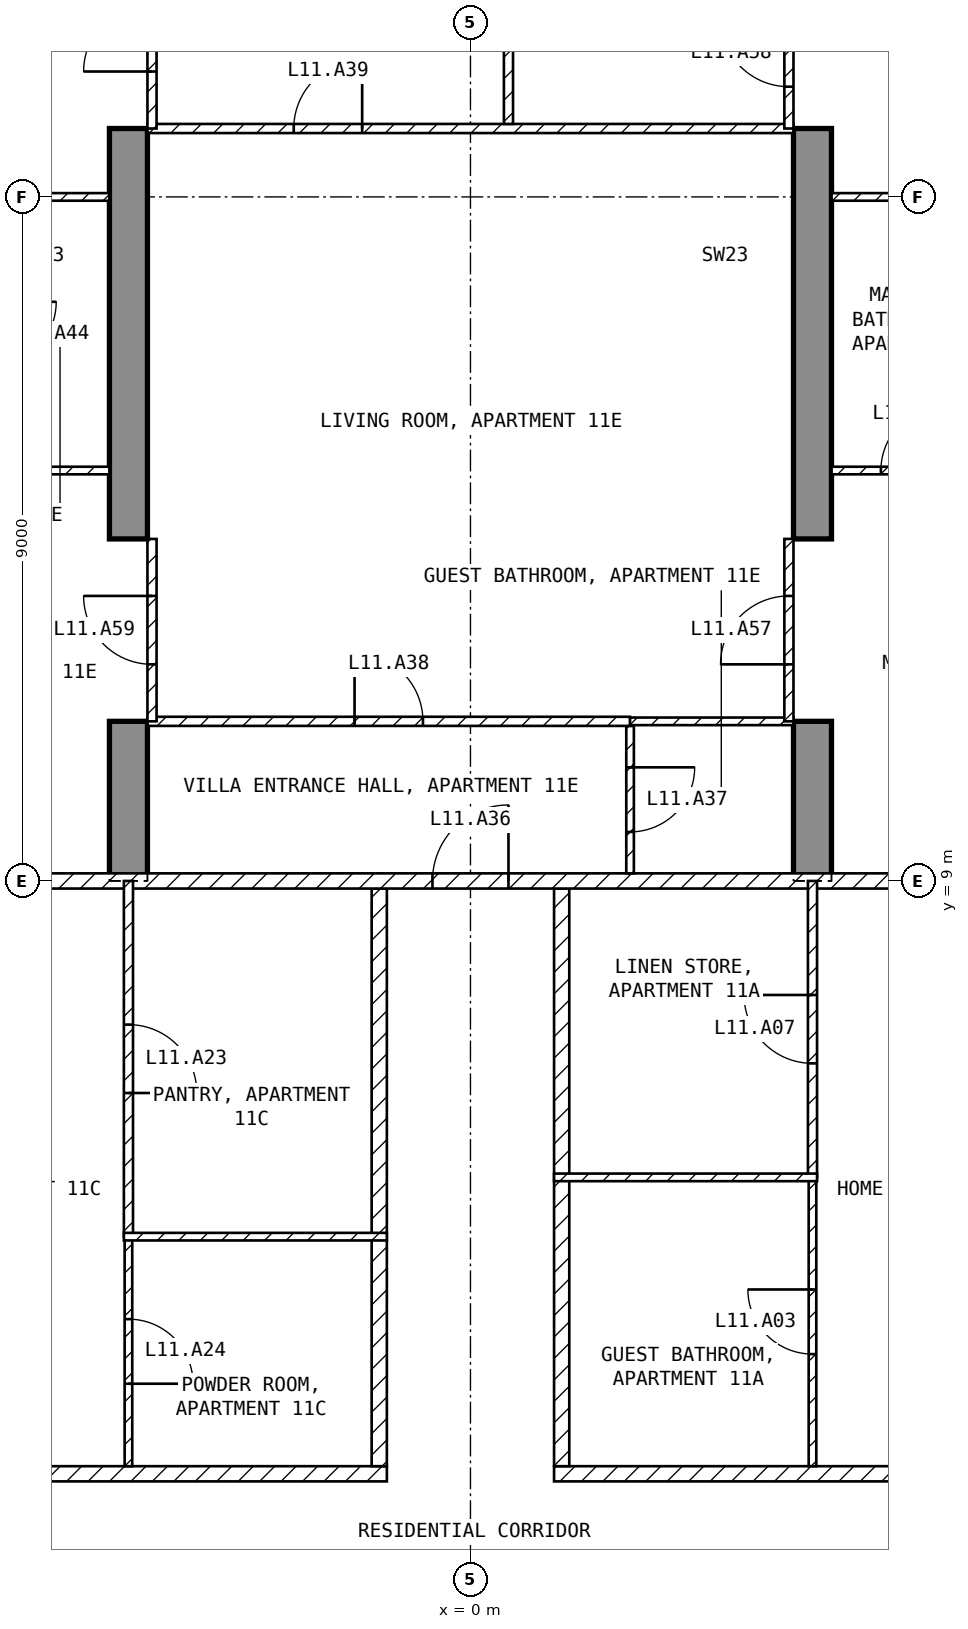
"""IFC4 building model, lengths in metres.
Left out: names, types, materials, properties, quantities, classifications, styles, units other than length and angle.
Written with IfcOpenShell. Run it as: python <this file> out.ifc"""

import sys

from ifc_helpers import new_model, si_unit, direction, frame, frame_2d, origin, place, context, subcontext, project, spatial, polyline, rectangle, outline, extrude, element, fill, save


model = new_model("IFC4")
c1 = context("Model", 3, precision=1e-05, world=origin(), true_north=direction((0.0, 1.0)))
c2 = subcontext(c1, "Body", "Model", "MODEL_VIEW")
j1 = project(units=[si_unit("LENGTHUNIT", "METRE"), si_unit("PLANEANGLEUNIT", "RADIAN")], contexts=[c1])
p1 = place(None, origin())
s1 = spatial("IfcSite", under=j1, at=p1, CompositionType="ELEMENT")
p2 = place(p1, origin())
s2 = spatial("IfcBuilding", under=s1, at=p2, CompositionType="ELEMENT")
p3 = place(p2, frame((0.0, 0.0, 57.5)))
s3 = spatial("IfcBuildingStorey", under=s2, at=p3, CompositionType="ELEMENT", Elevation=57.5)
for number, where, z_axis, x_axis in (
    (1, (-4.75, 9.0, -0.25), (1.0, 0.0, 0.0), (0.0, 1.0, 0.0)),
    (2, (4.25, 9.0, -0.25), (1.0, 0.0, 0.0), (0.0, 1.0, 0.0)),
):
    element("IfcWall", number, at=place(p3, frame(where, z_axis=z_axis, x_axis=x_axis)), inside=s3, PredefinedType="SHEAR", context=c2, shape_type="SweptSolid", body=[
        extrude(outline(polyline([(0.0, 0.0), (2.1, 0.0), (2.1, 2.65), (4.5, 2.65), (4.5, 0.0), (9.9, 0.0), (9.9, 2.65), (12.3, 2.65), (12.3, 0.0), (16.45, 0.0), (16.45, 3.5), (0.0, 3.5), (0.0, 0.0)])), origin(), (0.0, 0.0, 1.0), 0.5),
    ])
p4 = place(p3, frame((1.1, 1.2, 0.0), z_axis=(0.0, 0.0, 1.0), x_axis=(1.0, 0.0, 0.0)))
e3 = element("IfcWall", 3, at=p4, inside=s3, PredefinedType="PARTITIONING", context=c2, shape_type="SweptSolid", body=[
    extrude(rectangle(XDim=20.5, YDim=0.2, at=frame_2d((10.25, 0.0))), origin(), (0.0, 0.0, 1.0), 3.25),
])
p5 = place(p4, frame((9.2, 0.0, 0.0)))
e4 = element("IfcOpeningElement", 4, at=p5, cuts=e3, PredefinedType="OPENING", context=c2, shape_type="SweptSolid", body=[
    extrude(rectangle(XDim=1.0, YDim=2.1, at=frame_2d((0.5, 1.05))), frame((0.0, 0.11, 0.0), z_axis=(0.0, -1.0, 0.0), x_axis=(1.0, 0.0, 0.0)), (0.0, 0.0, 1.0), 0.22),
])
p6 = place(p3, frame((1.2, 8.9, 0.0), z_axis=(0.0, 0.0, 1.0), x_axis=(0.0, -1.0, 0.0)))
e5 = element("IfcWall", 5, at=p6, inside=s3, PredefinedType="PARTITIONING", context=c2, shape_type="SweptSolid", body=[
    extrude(rectangle(XDim=7.6, YDim=0.2, at=frame_2d((3.8, 0.0))), origin(), (0.0, 0.0, 1.0), 3.25),
])
p7 = place(p3, frame((-21.6, 1.2, 0.0), z_axis=(0.0, 0.0, 1.0), x_axis=(1.0, 0.0, 0.0)))
e6 = element("IfcWall", 6, at=p7, inside=s3, PredefinedType="PARTITIONING", context=c2, shape_type="SweptSolid", body=[
    extrude(rectangle(XDim=20.5, YDim=0.2, at=frame_2d((10.25, 0.0))), origin(), (0.0, 0.0, 1.0), 3.25),
])
p8 = place(p7, frame((10.3, 0.0, 0.0)))
e7 = element("IfcOpeningElement", 7, at=p8, cuts=e6, PredefinedType="OPENING", context=c2, shape_type="SweptSolid", body=[
    extrude(rectangle(XDim=1.0, YDim=2.1, at=frame_2d((0.5, 1.05))), frame((0.0, 0.11, 0.0), z_axis=(0.0, -1.0, 0.0), x_axis=(1.0, 0.0, 0.0)), (0.0, 0.0, 1.0), 0.22),
])
p9 = place(p3, frame((-1.2, 1.3, 0.0), z_axis=(0.0, 0.0, 1.0), x_axis=(0.0, 1.0, 0.0)))
e8 = element("IfcWall", 8, at=p9, inside=s3, PredefinedType="PARTITIONING", context=c2, shape_type="SweptSolid", body=[
    extrude(rectangle(XDim=7.6, YDim=0.2, at=frame_2d((3.8, 0.0))), origin(), (0.0, 0.0, 1.0), 3.25),
])
p10 = place(p3, frame((-8.92, 9.0, 0.0), z_axis=(0.0, 0.0, 1.0), x_axis=(1.0, 0.0, 0.0)))
e9 = element("IfcWall", 9, at=p10, inside=s3, PredefinedType="PARTITIONING", context=c2, shape_type="SweptSolid", body=[
    extrude(rectangle(XDim=17.84, YDim=0.2, at=frame_2d((8.92, 0.0))), origin(), (0.0, 0.0, 1.0), 3.25),
])
p11 = place(p10, frame((8.42, 0.0, 0.0)))
e10 = element("IfcOpeningElement", 10, at=p11, cuts=e9, PredefinedType="OPENING", context=c2, shape_type="SweptSolid", body=[
    extrude(rectangle(XDim=1.0, YDim=2.1, at=frame_2d((0.5, 1.05))), frame((0.0, 0.11, 0.0), z_axis=(0.0, -1.0, 0.0), x_axis=(1.0, 0.0, 0.0)), (0.0, 0.0, 1.0), 0.22),
])
p12 = place(p3, frame((4.5, 1.3, 0.0), z_axis=(0.0, 0.0, 1.0), x_axis=(0.0, 1.0, 0.0)))
e11 = element("IfcWall", 11, at=p12, inside=s3, PredefinedType="PARTITIONING", context=c2, shape_type="SweptSolid", body=[
    extrude(rectangle(XDim=3.8, YDim=0.1, at=frame_2d((1.9, 0.0))), origin(), (0.0, 0.0, 1.0), 3.25),
])
p13 = place(p12, frame((1.475, 0.0, 0.0)))
e12 = element("IfcOpeningElement", 12, at=p13, cuts=e11, PredefinedType="OPENING", context=c2, shape_type="SweptSolid", body=[
    extrude(rectangle(XDim=0.85, YDim=2.1, at=frame_2d((0.425, 1.05))), frame((0.0, 0.06, 0.0), z_axis=(0.0, -1.0, 0.0), x_axis=(1.0, 0.0, 0.0)), (0.0, 0.0, 1.0), 0.12),
])
p14 = place(p3, frame((4.5, 5.1, 0.0), z_axis=(0.0, 0.0, 1.0), x_axis=(0.0, 1.0, 0.0)))
e13 = element("IfcWall", 13, at=p14, inside=s3, PredefinedType="PARTITIONING", context=c2, shape_type="SweptSolid", body=[
    extrude(rectangle(XDim=3.9, YDim=0.12, at=frame_2d((1.95, 0.0))), origin(), (0.0, 0.0, 1.0), 3.25),
])
p15 = place(p14, frame((1.5, 0.0, 0.0)))
e14 = element("IfcOpeningElement", 14, at=p15, cuts=e13, PredefinedType="OPENING", context=c2, shape_type="SweptSolid", body=[
    extrude(rectangle(XDim=0.9, YDim=2.1, at=frame_2d((0.45, 1.05))), frame((0.0, 0.07, 0.0), z_axis=(0.0, -1.0, 0.0), x_axis=(1.0, 0.0, 0.0)), (0.0, 0.0, 1.0), 0.14),
])
p16 = place(p3, frame((1.1, 5.1, 0.0), z_axis=(0.0, 0.0, 1.0), x_axis=(1.0, 0.0, 0.0)))
e15 = element("IfcWall", 15, at=p16, inside=s3, PredefinedType="PARTITIONING", context=c2, shape_type="SweptSolid", body=[
    extrude(rectangle(XDim=3.46, YDim=0.1, at=frame_2d((1.73, 0.0))), origin(), (0.0, 0.0, 1.0), 3.25),
])
p17 = place(p3, frame((-4.5, 4.32, 0.0), z_axis=(0.0, 0.0, 1.0), x_axis=(0.0, -1.0, 0.0)))
e16 = element("IfcWall", 16, at=p17, inside=s3, PredefinedType="PARTITIONING", context=c2, shape_type="SweptSolid", body=[
    extrude(rectangle(XDim=3.02, YDim=0.1, at=frame_2d((1.51, 0.0))), origin(), (0.0, 0.0, 1.0), 3.25),
])
p18 = place(p17, frame((1.085, 0.0, 0.0)))
e17 = element("IfcOpeningElement", 17, at=p18, cuts=e16, PredefinedType="OPENING", context=c2, shape_type="SweptSolid", body=[
    extrude(rectangle(XDim=0.85, YDim=2.1, at=frame_2d((0.425, 1.05))), frame((0.0, 0.06, 0.0), z_axis=(0.0, -1.0, 0.0), x_axis=(1.0, 0.0, 0.0)), (0.0, 0.0, 1.0), 0.12),
])
p19 = place(p3, frame((-4.5, 9.0, 0.0), z_axis=(0.0, 0.0, 1.0), x_axis=(0.0, -1.0, 0.0)))
e18 = element("IfcWall", 18, at=p19, inside=s3, PredefinedType="PARTITIONING", context=c2, shape_type="SweptSolid", body=[
    extrude(rectangle(XDim=4.68, YDim=0.12, at=frame_2d((2.34, 0.0))), origin(), (0.0, 0.0, 1.0), 3.25),
])
p20 = place(p19, frame((1.89, 0.0, 0.0)))
e19 = element("IfcOpeningElement", 19, at=p20, cuts=e18, PredefinedType="OPENING", context=c2, shape_type="SweptSolid", body=[
    extrude(rectangle(XDim=0.9, YDim=2.1, at=frame_2d((0.45, 1.05))), frame((0.0, 0.07, 0.0), z_axis=(0.0, -1.0, 0.0), x_axis=(1.0, 0.0, 0.0)), (0.0, 0.0, 1.0), 0.14),
])
p21 = place(p3, frame((-4.56, 4.32, 0.0), z_axis=(0.0, 0.0, 1.0), x_axis=(1.0, 0.0, 0.0)))
e20 = element("IfcWall", 20, at=p21, inside=s3, PredefinedType="PARTITIONING", context=c2, shape_type="SweptSolid", body=[
    extrude(rectangle(XDim=3.46, YDim=0.1, at=frame_2d((1.73, 0.0))), origin(), (0.0, 0.0, 1.0), 3.25),
])
p22 = place(p3, frame((2.1, 11.04, 0.0), z_axis=(0.0, 0.0, 1.0), x_axis=(0.0, -1.0, 0.0)))
e21 = element("IfcWall", 21, at=p22, inside=s3, PredefinedType="PARTITIONING", context=c2, shape_type="SweptSolid", body=[
    extrude(rectangle(XDim=1.94, YDim=0.1, at=frame_2d((0.97, 0.0))), origin(), (0.0, 0.0, 1.0), 3.25),
])
p23 = place(p22, frame((0.545, 0.0, 0.0)))
e22 = element("IfcOpeningElement", 22, at=p23, cuts=e21, PredefinedType="OPENING", context=c2, shape_type="SweptSolid", body=[
    extrude(rectangle(XDim=0.85, YDim=2.1, at=frame_2d((0.425, 1.05))), frame((0.0, 0.06, 0.0), z_axis=(0.0, -1.0, 0.0), x_axis=(1.0, 0.0, 0.0)), (0.0, 0.0, 1.0), 0.12),
])
p24 = place(p3, frame((-4.25, 11.1, 0.0), z_axis=(0.0, 0.0, 1.0), x_axis=(1.0, 0.0, 0.0)))
e23 = element("IfcWall", 23, at=p24, inside=s3, PredefinedType="PARTITIONING", context=c2, shape_type="SweptSolid", body=[
    extrude(rectangle(XDim=6.35, YDim=0.12, at=frame_2d((3.175, 0.0))), origin(), (0.0, 0.0, 1.0), 3.25),
])
p25 = place(p24, frame((2.725, 0.0, 0.0)))
e24 = element("IfcOpeningElement", 24, at=p25, cuts=e23, PredefinedType="OPENING", context=c2, shape_type="SweptSolid", body=[
    extrude(rectangle(XDim=0.9, YDim=2.1, at=frame_2d((0.45, 1.05))), frame((0.0, 0.07, 0.0), z_axis=(0.0, -1.0, 0.0), x_axis=(1.0, 0.0, 0.0)), (0.0, 0.0, 1.0), 0.14),
])
p26 = place(p3, frame((2.1, 11.1, 0.0), z_axis=(0.0, 0.0, 1.0), x_axis=(1.0, 0.0, 0.0)))
e25 = element("IfcWall", 25, at=p26, inside=s3, PredefinedType="PARTITIONING", context=c2, shape_type="SweptSolid", body=[
    extrude(rectangle(XDim=2.15, YDim=0.1, at=frame_2d((1.075, 0.0))), origin(), (0.0, 0.0, 1.0), 3.25),
])
p27 = place(p3, frame((-4.25, 18.9, 0.0), z_axis=(0.0, 0.0, 1.0), x_axis=(1.0, 0.0, 0.0)))
e26 = element("IfcWall", 26, at=p27, inside=s3, PredefinedType="PARTITIONING", context=c2, shape_type="SweptSolid", body=[
    extrude(rectangle(XDim=8.5, YDim=0.12, at=frame_2d((4.25, 0.0))), origin(), (0.0, 0.0, 1.0), 3.25),
])
p28 = place(p27, frame((1.925, 0.0, 0.0)))
e27 = element("IfcOpeningElement", 27, at=p28, cuts=e26, PredefinedType="OPENING", context=c2, shape_type="SweptSolid", body=[
    extrude(rectangle(XDim=0.9, YDim=2.1, at=frame_2d((0.45, 1.05))), frame((0.0, 0.07, 0.0), z_axis=(0.0, -1.0, 0.0), x_axis=(1.0, 0.0, 0.0)), (0.0, 0.0, 1.0), 0.14),
])
p29 = place(p3, frame((0.5, 23.34, 0.0), z_axis=(0.0, 0.0, 1.0), x_axis=(0.0, -1.0, 0.0)))
e28 = element("IfcWall", 28, at=p29, inside=s3, PredefinedType="PARTITIONING", context=c2, shape_type="SweptSolid", body=[
    extrude(rectangle(XDim=4.38, YDim=0.12, at=frame_2d((2.19, 0.0))), origin(), (0.0, 0.0, 1.0), 3.25),
])
p30 = place(p29, frame((1.74, 0.0, 0.0)))
e29 = element("IfcOpeningElement", 29, at=p30, cuts=e28, PredefinedType="OPENING", context=c2, shape_type="SweptSolid", body=[
    extrude(rectangle(XDim=0.9, YDim=2.1, at=frame_2d((0.45, 1.05))), frame((0.0, 0.07, 0.0), z_axis=(0.0, -1.0, 0.0), x_axis=(1.0, 0.0, 0.0)), (0.0, 0.0, 1.0), 0.14),
])
p31 = place(p3, frame((4.75, 14.4, 0.0), z_axis=(0.0, 0.0, 1.0), x_axis=(1.0, 0.0, 0.0)))
e30 = element("IfcWall", 30, at=p31, inside=s3, PredefinedType="PARTITIONING", context=c2, shape_type="SweptSolid", body=[
    extrude(rectangle(XDim=2.2, YDim=0.1, at=frame_2d((1.1, 0.0))), origin(), (0.0, 0.0, 1.0), 3.25),
])
p32 = place(p31, frame((0.65, 0.0, 0.0)))
e31 = element("IfcOpeningElement", 31, at=p32, cuts=e30, PredefinedType="OPENING", context=c2, shape_type="SweptSolid", body=[
    extrude(rectangle(XDim=0.85, YDim=2.1, at=frame_2d((0.425, 1.05))), frame((0.0, 0.06, 0.0), z_axis=(0.0, -1.0, 0.0), x_axis=(1.0, 0.0, 0.0)), (0.0, 0.0, 1.0), 0.12),
])
p33 = place(p3, frame((4.75, 18.0, 0.0), z_axis=(0.0, 0.0, 1.0), x_axis=(1.0, 0.0, 0.0)))
e32 = element("IfcWall", 32, at=p33, inside=s3, PredefinedType="PARTITIONING", context=c2, shape_type="SweptSolid", body=[
    extrude(rectangle(XDim=2.15, YDim=0.1, at=frame_2d((1.075, 0.0))), origin(), (0.0, 0.0, 1.0), 2.346),
])
p34 = place(p3, frame((-6.35, 14.4, 0.0), z_axis=(0.0, 0.0, 1.0), x_axis=(1.0, 0.0, 0.0)))
e33 = element("IfcWall", 33, at=p34, inside=s3, PredefinedType="PARTITIONING", context=c2, shape_type="SweptSolid", body=[
    extrude(rectangle(XDim=1.6, YDim=0.1, at=frame_2d((0.8, 0.0))), origin(), (0.0, 0.0, 1.0), 3.25),
])
p35 = place(p3, frame((-6.3, 18.0, 0.0), z_axis=(0.0, 0.0, 1.0), x_axis=(1.0, 0.0, 0.0)))
e34 = element("IfcWall", 34, at=p35, inside=s3, PredefinedType="PARTITIONING", context=c2, shape_type="SweptSolid", body=[
    extrude(rectangle(XDim=1.55, YDim=0.1, at=frame_2d((0.775, 0.0))), origin(), (0.0, 0.0, 1.0), 2.346),
])
p36 = place(p3, frame((4.19, 11.1, 0.0), z_axis=(0.0, 0.0, 1.0), x_axis=(0.0, 1.0, 0.0)))
e35 = element("IfcWall", 35, at=p36, inside=s3, PredefinedType="PARTITIONING", context=c2, shape_type="SweptSolid", body=[
    extrude(rectangle(XDim=2.4, YDim=0.12, at=frame_2d((1.2, 0.0))), origin(), (0.0, 0.0, 1.0), 2.4),
])
p37 = place(p36, frame((0.75, 0.0, 0.0)))
e36 = element("IfcOpeningElement", 36, at=p37, cuts=e35, PredefinedType="OPENING", context=c2, shape_type="SweptSolid", body=[
    extrude(rectangle(XDim=0.9, YDim=2.1, at=frame_2d((0.45, 1.05))), frame((0.0, 0.07, 0.0), z_axis=(0.0, -1.0, 0.0), x_axis=(1.0, 0.0, 0.0)), (0.0, 0.0, 1.0), 0.14),
])
p38 = place(p3, frame((4.19, 18.9, 0.0), z_axis=(0.0, 0.0, 1.0), x_axis=(0.0, 1.0, 0.0)))
e37 = element("IfcWall", 37, at=p38, inside=s3, PredefinedType="PARTITIONING", context=c2, shape_type="SweptSolid", body=[
    extrude(rectangle(XDim=2.4, YDim=0.12, at=frame_2d((1.2, 0.0))), origin(), (0.0, 0.0, 1.0), 2.4),
])
p39 = place(p38, frame((0.55, 0.0, 0.0)))
e38 = element("IfcOpeningElement", 38, at=p39, cuts=e37, PredefinedType="OPENING", context=c2, shape_type="SweptSolid", body=[
    extrude(rectangle(XDim=0.9, YDim=2.1, at=frame_2d((0.45, 1.05))), frame((0.0, 0.07, 0.0), z_axis=(0.0, -1.0, 0.0), x_axis=(1.0, 0.0, 0.0)), (0.0, 0.0, 1.0), 0.14),
])
p40 = place(p3, frame((-4.19, 11.1, 0.0), z_axis=(0.0, 0.0, 1.0), x_axis=(0.0, 1.0, 0.0)))
e39 = element("IfcWall", 39, at=p40, inside=s3, PredefinedType="PARTITIONING", context=c2, shape_type="SweptSolid", body=[
    extrude(rectangle(XDim=2.4, YDim=0.12, at=frame_2d((1.2, 0.0))), origin(), (0.0, 0.0, 1.0), 2.4),
])
p41 = place(p40, frame((0.75, 0.0, 0.0)))
e40 = element("IfcOpeningElement", 40, at=p41, cuts=e39, PredefinedType="OPENING", context=c2, shape_type="SweptSolid", body=[
    extrude(rectangle(XDim=0.9, YDim=2.1, at=frame_2d((0.45, 1.05))), frame((0.0, 0.07, 0.0), z_axis=(0.0, -1.0, 0.0), x_axis=(1.0, 0.0, 0.0)), (0.0, 0.0, 1.0), 0.14),
])
p42 = place(p3, frame((-4.19, 18.9, 0.0), z_axis=(0.0, 0.0, 1.0), x_axis=(0.0, 1.0, 0.0)))
e41 = element("IfcWall", 41, at=p42, inside=s3, PredefinedType="PARTITIONING", context=c2, shape_type="SweptSolid", body=[
    extrude(rectangle(XDim=2.4, YDim=0.12, at=frame_2d((1.2, 0.0))), origin(), (0.0, 0.0, 1.0), 2.4),
])
p43 = place(p42, frame((0.75, 0.0, 0.0)))
e42 = element("IfcOpeningElement", 42, at=p43, cuts=e41, PredefinedType="OPENING", context=c2, shape_type="SweptSolid", body=[
    extrude(rectangle(XDim=0.9, YDim=2.1, at=frame_2d((0.45, 1.05))), frame((0.0, 0.07, 0.0), z_axis=(0.0, -1.0, 0.0), x_axis=(1.0, 0.0, 0.0)), (0.0, 0.0, 1.0), 0.14),
])
p44 = place(p13, origin())
e43 = element("IfcDoor", 43, at=p44, inside=s3, OperationType="SINGLE_SWING_RIGHT", PredefinedType="DOOR", context=c2, shape_type="SweptSolid", body=[
    extrude(rectangle(XDim=0.85, YDim=2.1, at=frame_2d((0.425, 1.05))), frame((0.0, 0.025, 0.0), z_axis=(0.0, -1.0, 0.0), x_axis=(1.0, 0.0, 0.0)), (0.0, 0.0, 1.0), 0.05),
])
fill(e12, e43)
p45 = place(p15, origin())
e44 = element("IfcDoor", 44, at=p45, inside=s3, OperationType="SINGLE_SWING_RIGHT", PredefinedType="DOOR", context=c2, shape_type="SweptSolid", body=[
    extrude(rectangle(XDim=0.9, YDim=2.1, at=frame_2d((0.45, 1.05))), frame((0.0, 0.025, 0.0), z_axis=(0.0, -1.0, 0.0), x_axis=(1.0, 0.0, 0.0)), (0.0, 0.0, 1.0), 0.05),
])
fill(e14, e44)
p46 = place(p20, origin())
e45 = element("IfcDoor", 45, at=p46, inside=s3, OperationType="SINGLE_SWING_RIGHT", PredefinedType="DOOR", context=c2, shape_type="SweptSolid", body=[
    extrude(rectangle(XDim=0.9, YDim=2.1, at=frame_2d((0.45, 1.05))), frame((0.0, 0.025, 0.0), z_axis=(0.0, -1.0, 0.0), x_axis=(1.0, 0.0, 0.0)), (0.0, 0.0, 1.0), 0.05),
])
fill(e19, e45)
p47 = place(p18, origin())
e46 = element("IfcDoor", 46, at=p47, inside=s3, OperationType="SINGLE_SWING_RIGHT", PredefinedType="DOOR", context=c2, shape_type="SweptSolid", body=[
    extrude(rectangle(XDim=0.85, YDim=2.1, at=frame_2d((0.425, 1.05))), frame((0.0, 0.025, 0.0), z_axis=(0.0, -1.0, 0.0), x_axis=(1.0, 0.0, 0.0)), (0.0, 0.0, 1.0), 0.05),
])
fill(e17, e46)
p48 = place(p11, origin())
e47 = element("IfcDoor", 47, at=p48, inside=s3, OperationType="SINGLE_SWING_RIGHT", PredefinedType="DOOR", context=c2, shape_type="SweptSolid", body=[
    extrude(rectangle(XDim=1.0, YDim=2.1, at=frame_2d((0.5, 1.05))), frame((0.0, 0.025, 0.0), z_axis=(0.0, -1.0, 0.0), x_axis=(1.0, 0.0, 0.0)), (0.0, 0.0, 1.0), 0.05),
])
fill(e10, e47)
p49 = place(p23, origin())
e48 = element("IfcDoor", 48, at=p49, inside=s3, OperationType="SINGLE_SWING_LEFT", PredefinedType="DOOR", context=c2, shape_type="SweptSolid", body=[
    extrude(rectangle(XDim=0.85, YDim=2.1, at=frame_2d((0.425, 1.05))), frame((0.0, 0.025, 0.0), z_axis=(0.0, -1.0, 0.0), x_axis=(1.0, 0.0, 0.0)), (0.0, 0.0, 1.0), 0.05),
])
fill(e22, e48)
p50 = place(p25, origin())
e49 = element("IfcDoor", 49, at=p50, inside=s3, OperationType="SINGLE_SWING_LEFT", PredefinedType="DOOR", context=c2, shape_type="SweptSolid", body=[
    extrude(rectangle(XDim=0.9, YDim=2.1, at=frame_2d((0.45, 1.05))), frame((0.0, 0.025, 0.0), z_axis=(0.0, -1.0, 0.0), x_axis=(1.0, 0.0, 0.0)), (0.0, 0.0, 1.0), 0.05),
])
fill(e24, e49)
p51 = place(p28, origin())
e50 = element("IfcDoor", 50, at=p51, inside=s3, OperationType="SINGLE_SWING_RIGHT", PredefinedType="DOOR", context=c2, shape_type="SweptSolid", body=[
    extrude(rectangle(XDim=0.9, YDim=2.1, at=frame_2d((0.45, 1.05))), frame((0.0, 0.025, 0.0), z_axis=(0.0, -1.0, 0.0), x_axis=(1.0, 0.0, 0.0)), (0.0, 0.0, 1.0), 0.05),
])
fill(e27, e50)
p52 = place(p32, origin())
e51 = element("IfcDoor", 51, at=p52, inside=s3, OperationType="SINGLE_SWING_RIGHT", PredefinedType="DOOR", context=c2, shape_type="SweptSolid", body=[
    extrude(rectangle(XDim=0.85, YDim=2.1, at=frame_2d((0.425, 1.05))), frame((0.0, 0.025, 0.0), z_axis=(0.0, -1.0, 0.0), x_axis=(1.0, 0.0, 0.0)), (0.0, 0.0, 1.0), 0.05),
])
fill(e31, e51)
p53 = place(p37, origin())
e52 = element("IfcDoor", 52, at=p53, inside=s3, OperationType="SINGLE_SWING_LEFT", PredefinedType="DOOR", context=c2, shape_type="SweptSolid", body=[
    extrude(rectangle(XDim=0.9, YDim=2.1, at=frame_2d((0.45, 1.05))), frame((0.0, 0.025, 0.0), z_axis=(0.0, -1.0, 0.0), x_axis=(1.0, 0.0, 0.0)), (0.0, 0.0, 1.0), 0.05),
])
fill(e36, e52)
p54 = place(p39, origin())
e53 = element("IfcDoor", 53, at=p54, inside=s3, OperationType="SINGLE_SWING_RIGHT", PredefinedType="DOOR", context=c2, shape_type="SweptSolid", body=[
    extrude(rectangle(XDim=0.9, YDim=2.1, at=frame_2d((0.45, 1.05))), frame((0.0, 0.025, 0.0), z_axis=(0.0, -1.0, 0.0), x_axis=(1.0, 0.0, 0.0)), (0.0, 0.0, 1.0), 0.05),
])
fill(e38, e53)
p55 = place(p41, origin())
e54 = element("IfcDoor", 54, at=p55, inside=s3, OperationType="SINGLE_SWING_RIGHT", PredefinedType="DOOR", context=c2, shape_type="SweptSolid", body=[
    extrude(rectangle(XDim=0.9, YDim=2.1, at=frame_2d((0.45, 1.05))), frame((0.0, 0.025, 0.0), z_axis=(0.0, -1.0, 0.0), x_axis=(1.0, 0.0, 0.0)), (0.0, 0.0, 1.0), 0.05),
])
fill(e40, e54)
p56 = place(p43, origin())
e55 = element("IfcDoor", 55, at=p56, inside=s3, OperationType="SINGLE_SWING_LEFT", PredefinedType="DOOR", context=c2, shape_type="SweptSolid", body=[
    extrude(rectangle(XDim=0.9, YDim=2.1, at=frame_2d((0.45, 1.05))), frame((0.0, 0.025, 0.0), z_axis=(0.0, -1.0, 0.0), x_axis=(1.0, 0.0, 0.0)), (0.0, 0.0, 1.0), 0.05),
])
fill(e42, e55)
save(model, sys.argv[1])
